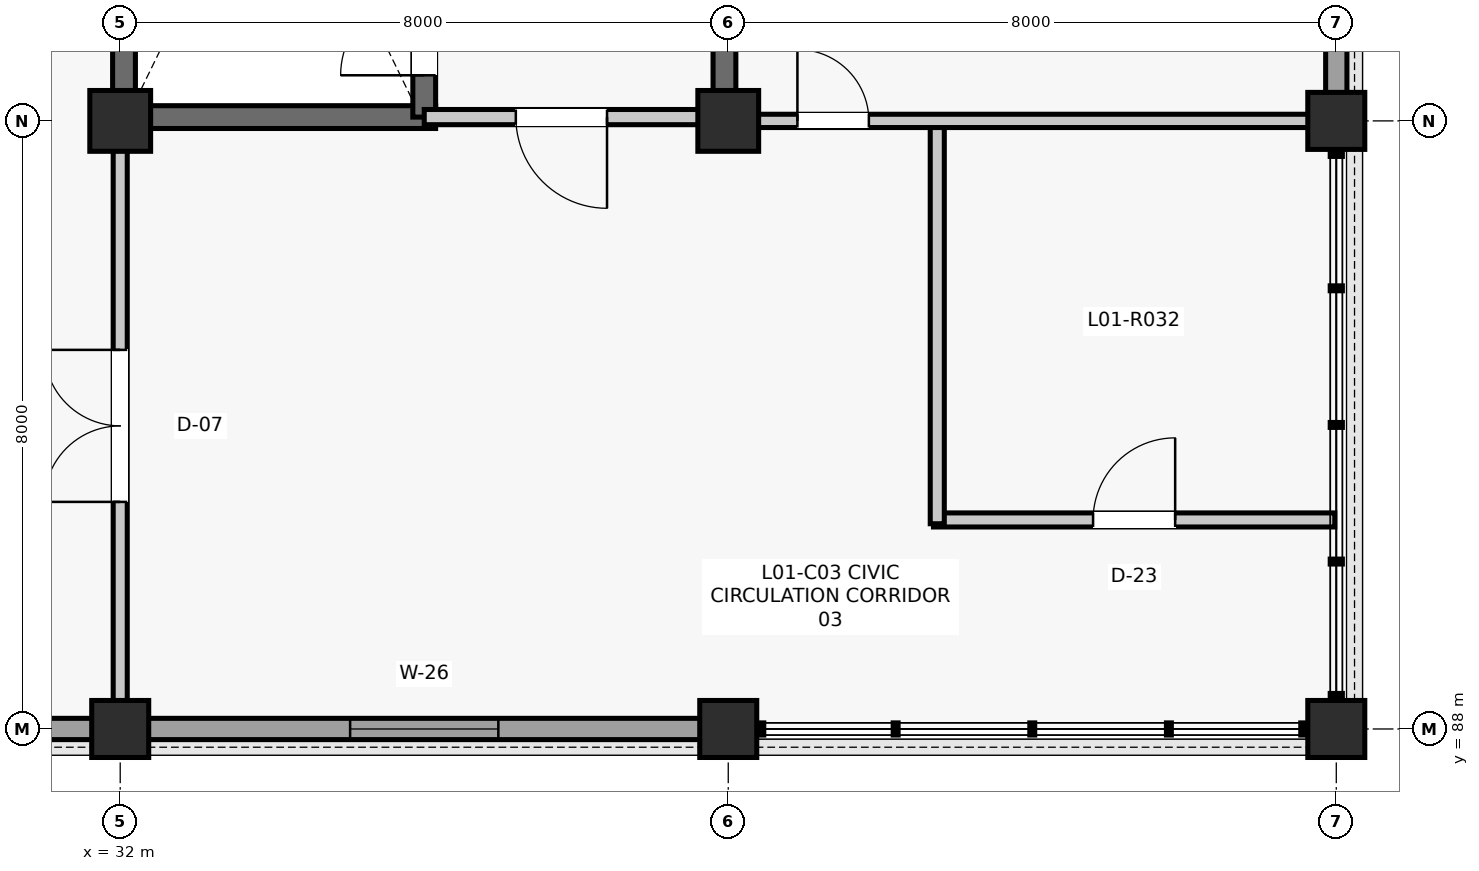
"""IFC4 building model, lengths in metres.
Left out: names, types, materials, properties, quantities, classifications, styles, units other than length and angle.
Written with IfcOpenShell. Run it as: python <this file> out.ifc"""

import sys

from ifc_helpers import new_model, si_unit, direction, frame, frame_2d, origin, origin_2d, place, context, subcontext, project, spatial, rectangle, extrude, element, fill, save


model = new_model("IFC4")
c1 = context("Model", 3, precision=1e-05, world=origin(), true_north=direction((0.0, 1.0)))
c2 = subcontext(c1, "Body", "Model", "MODEL_VIEW")
j1 = project(units=[si_unit("LENGTHUNIT", "METRE"), si_unit("PLANEANGLEUNIT", "RADIAN")], contexts=[c1])
p1 = place(None, origin())
s1 = spatial("IfcSite", under=j1, at=p1, CompositionType="ELEMENT")
p2 = place(p1, origin())
s2 = spatial("IfcBuilding", under=s1, at=p2, CompositionType="ELEMENT")
p3 = place(p2, frame((0.0, 0.0, 5.28)))
s3 = spatial("IfcBuildingStorey", under=s2, at=p3, CompositionType="ELEMENT", Elevation=5.28)
p4 = place(p3, frame((32.0, 88.0, 0.0), z_axis=(0.0, 0.0, 1.0), x_axis=(1.0, 0.0, 0.0)))
e1 = element("IfcColumn", 1, at=p4, inside=s3, PredefinedType="COLUMN", context=c2, shape_type="SweptSolid", body=[
    extrude(rectangle(XDim=0.75, YDim=0.75, at=origin_2d()), origin(), (0.0, 0.0, 1.0), 4.62),
])
p5 = place(p3, frame((32.0, 96.0, 0.0), z_axis=(0.0, 0.0, 1.0), x_axis=(1.0, 0.0, 0.0)))
e2 = element("IfcColumn", 2, at=p5, inside=s3, PredefinedType="COLUMN", context=c2, shape_type="SweptSolid", body=[
    extrude(rectangle(XDim=0.8, YDim=0.8, at=origin_2d()), origin(), (0.0, 0.0, 1.0), 4.62),
])
p6 = place(p3, frame((40.0, 88.0, 0.0), z_axis=(0.0, 0.0, 1.0), x_axis=(1.0, 0.0, 0.0)))
e3 = element("IfcColumn", 3, at=p6, inside=s3, PredefinedType="COLUMN", context=c2, shape_type="SweptSolid", body=[
    extrude(rectangle(XDim=0.75, YDim=0.75, at=origin_2d()), origin(), (0.0, 0.0, 1.0), 4.62),
])
p7 = place(p3, frame((40.0, 96.0, 0.0), z_axis=(0.0, 0.0, 1.0), x_axis=(1.0, 0.0, 0.0)))
e4 = element("IfcColumn", 4, at=p7, inside=s3, PredefinedType="COLUMN", context=c2, shape_type="SweptSolid", body=[
    extrude(rectangle(XDim=0.8, YDim=0.8, at=origin_2d()), origin(), (0.0, 0.0, 1.0), 4.62),
])
for number, where, z_axis, x_axis in (
    (5, (48.0, 88.0, 0.0), (0.0, 0.0, 1.0), (1.0, 0.0, 0.0)),
    (6, (48.0, 96.0, 0.0), (0.0, 0.0, 1.0), (1.0, 0.0, 0.0)),
):
    element("IfcColumn", number, at=place(p3, frame(where, z_axis=z_axis, x_axis=x_axis)), inside=s3, PredefinedType="COLUMN", context=c2, shape_type="SweptSolid", body=[
        extrude(rectangle(XDim=0.75, YDim=0.75, at=origin_2d()), origin(), (0.0, 0.0, 1.0), 4.62),
    ])
p8 = place(p3, frame((24.36, 88.0, 0.0), z_axis=(0.0, 0.0, 1.0), x_axis=(1.0, 0.0, 0.0)))
e7 = element("IfcWall", 7, at=p8, inside=s3, PredefinedType="SOLIDWALL", context=c2, shape_type="SweptSolid", body=[
    extrude(rectangle(XDim=7.28, YDim=0.28, at=frame_2d((3.64, 0.0))), origin(), (0.0, 0.0, 1.0), 3.977),
])
p9 = place(p8, frame((2.74, 0.0, 0.9)))
e8 = element("IfcOpeningElement", 8, at=p9, cuts=e7, PredefinedType="OPENING", context=c2, shape_type="SweptSolid", body=[
    extrude(rectangle(XDim=1.8, YDim=2.3, at=frame_2d((0.9, 1.15))), frame((0.0, 0.15, 0.0), z_axis=(0.0, -1.0, 0.0), x_axis=(1.0, 0.0, 0.0)), (0.0, 0.0, 1.0), 0.3),
])
p10 = place(p3, frame((32.36, 88.0, 0.0), z_axis=(0.0, 0.0, 1.0), x_axis=(1.0, 0.0, 0.0)))
e9 = element("IfcWall", 9, at=p10, inside=s3, PredefinedType="SOLIDWALL", context=c2, shape_type="SweptSolid", body=[
    extrude(rectangle(XDim=7.28, YDim=0.28, at=frame_2d((3.64, 0.0))), origin(), (0.0, 0.0, 1.0), 3.91),
])
p11 = place(p10, frame((2.665, 0.0, 0.9)))
e10 = element("IfcOpeningElement", 10, at=p11, cuts=e9, PredefinedType="OPENING", context=c2, shape_type="SweptSolid", body=[
    extrude(rectangle(XDim=1.95, YDim=2.45, at=frame_2d((0.975, 1.225))), frame((0.0, 0.15, 0.0), z_axis=(0.0, -1.0, 0.0), x_axis=(1.0, 0.0, 0.0)), (0.0, 0.0, 1.0), 0.3),
])
p12 = place(p3, frame((48.0, 96.36, 0.0), z_axis=(0.0, 0.0, 1.0), x_axis=(0.0, 1.0, 0.0)))
e11 = element("IfcWall", 11, at=p12, inside=s3, PredefinedType="SOLIDWALL", context=c2, shape_type="SweptSolid", body=[
    extrude(rectangle(XDim=7.28, YDim=0.28, at=frame_2d((3.64, 0.0))), origin(), (0.0, 0.0, 1.0), 3.977),
])
p13 = place(p12, frame((2.59, 0.0, 0.9)))
e12 = element("IfcOpeningElement", 12, at=p13, cuts=e11, PredefinedType="OPENING", context=c2, shape_type="SweptSolid", body=[
    extrude(rectangle(XDim=2.1, YDim=2.4, at=frame_2d((1.05, 1.2))), frame((0.0, 0.15, 0.0), z_axis=(0.0, -1.0, 0.0), x_axis=(1.0, 0.0, 0.0)), (0.0, 0.0, 1.0), 0.3),
])
for number, where, z_axis, x_axis in (
    (13, (32.05, 96.29, 0.0), (0.0, 0.0, 1.0), (0.0, 1.0, 0.0)),
    (14, (39.95, 96.29, 0.0), (0.0, 0.0, 1.0), (0.0, 1.0, 0.0)),
):
    element("IfcWall", number, at=place(p3, frame(where, z_axis=z_axis, x_axis=x_axis)), inside=s3, PredefinedType="SHEAR", context=c2, shape_type="SweptSolid", body=[
        extrude(rectangle(XDim=7.42, YDim=0.3, at=frame_2d((3.71, 0.0))), origin(), (0.0, 0.0, 1.0), 4.335),
    ])
p14 = place(p3, frame((32.29, 96.05, 0.0), z_axis=(0.0, 0.0, 1.0), x_axis=(1.0, 0.0, 0.0)))
e15 = element("IfcWall", 15, at=p14, inside=s3, PredefinedType="SHEAR", context=c2, shape_type="SweptSolid", body=[
    extrude(rectangle(XDim=3.86, YDim=0.3, at=frame_2d((1.93, 0.0))), origin(), (0.0, 0.0, 1.0), 4.335),
])
p15 = place(p3, frame((36.0, 96.05, 0.0), z_axis=(0.0, 0.0, 1.0), x_axis=(0.0, 1.0, 0.0)))
e16 = element("IfcWall", 16, at=p15, inside=s3, PredefinedType="SHEAR", context=c2, shape_type="SweptSolid", body=[
    extrude(rectangle(XDim=7.9, YDim=0.3, at=frame_2d((3.95, 0.0))), origin(), (0.0, 0.0, 1.0), 4.335),
])
p16 = place(p15, frame((0.55, 0.0, 0.0)))
e17 = element("IfcOpeningElement", 17, at=p16, cuts=e16, PredefinedType="OPENING", context=c2, shape_type="SweptSolid", body=[
    extrude(rectangle(XDim=1.1, YDim=2.15, at=frame_2d((0.55, 1.075))), frame((0.0, 0.16, 0.0), z_axis=(0.0, -1.0, 0.0), x_axis=(1.0, 0.0, 0.0)), (0.0, 0.0, 1.0), 0.32),
])
p17 = place(p3, frame((36.0, 96.05, 0.0), z_axis=(0.0, 0.0, 1.0), x_axis=(1.0, 0.0, 0.0)))
e18 = element("IfcWall", 18, at=p17, inside=s3, PredefinedType="PARTITIONING", context=c2, shape_type="SweptSolid", body=[
    extrude(rectangle(XDim=3.61, YDim=0.2, at=frame_2d((1.805, 0.0))), origin(), (0.0, 0.0, 1.0), 3.712),
])
p18 = place(p17, frame((1.205, 0.0, 0.0)))
e19 = element("IfcOpeningElement", 19, at=p18, cuts=e18, PredefinedType="OPENING", context=c2, shape_type="SweptSolid", body=[
    extrude(rectangle(XDim=1.2, YDim=2.15, at=frame_2d((0.6, 1.075))), frame((0.0, 0.11, 0.0), z_axis=(0.0, -1.0, 0.0), x_axis=(1.0, 0.0, 0.0)), (0.0, 0.0, 1.0), 0.22),
])
p19 = place(p3, frame((42.7, 90.75, 0.0), z_axis=(0.0, 0.0, 1.0), x_axis=(1.0, 0.0, 0.0)))
e20 = element("IfcWall", 20, at=p19, inside=s3, PredefinedType="PARTITIONING", context=c2, shape_type="SweptSolid", body=[
    extrude(rectangle(XDim=5.28, YDim=0.185, at=frame_2d((2.64, 0.0))), origin(), (0.0, 0.0, 1.0), 3.907),
])
p20 = place(p19, frame((2.1, 0.0, 0.0)))
e21 = element("IfcOpeningElement", 21, at=p20, cuts=e20, PredefinedType="OPENING", context=c2, shape_type="SweptSolid", body=[
    extrude(rectangle(XDim=1.08, YDim=2.2, at=frame_2d((0.54, 1.1))), frame((0.0, 0.103, 0.0), z_axis=(0.0, -1.0, 0.0), x_axis=(1.0, 0.0, 0.0)), (0.0, 0.0, 1.0), 0.205),
])
p21 = place(p3, frame((42.75, 90.7, 0.0), z_axis=(0.0, 0.0, 1.0), x_axis=(0.0, 1.0, 0.0)))
e22 = element("IfcWall", 22, at=p21, inside=s3, PredefinedType="PARTITIONING", context=c2, shape_type="SweptSolid", body=[
    extrude(rectangle(XDim=5.28, YDim=0.185, at=frame_2d((2.64, 0.0))), origin(), (0.0, 0.0, 1.0), 3.787),
])
p22 = place(p3, frame((32.0, 88.365, 0.0), z_axis=(0.0, 0.0, 1.0), x_axis=(0.0, 1.0, 0.0)))
e23 = element("IfcWall", 23, at=p22, inside=s3, PredefinedType="PARTITIONING", context=c2, shape_type="SweptSolid", body=[
    extrude(rectangle(XDim=7.245, YDim=0.185, at=frame_2d((3.623, 0.0))), origin(), (0.0, 0.0, 1.0), 3.851),
])
p23 = place(p22, frame((2.623, 0.0, 0.0)))
e24 = element("IfcOpeningElement", 24, at=p23, cuts=e23, PredefinedType="OPENING", context=c2, shape_type="SweptSolid", body=[
    extrude(rectangle(XDim=2.0, YDim=2.4, at=frame_2d((1.0, 1.2))), frame((0.0, 0.103, 0.0), z_axis=(0.0, -1.0, 0.0), x_axis=(1.0, 0.0, 0.0)), (0.0, 0.0, 1.0), 0.205),
])
p24 = place(p3, frame((40.39, 96.0, 0.0), z_axis=(0.0, 0.0, 1.0), x_axis=(1.0, 0.0, 0.0)))
e25 = element("IfcWall", 25, at=p24, inside=s3, PredefinedType="PARTITIONING", context=c2, shape_type="SweptSolid", body=[
    extrude(rectangle(XDim=7.245, YDim=0.175, at=frame_2d((3.623, 0.0))), origin(), (0.0, 0.0, 1.0), 3.787),
])
p25 = place(p24, frame((0.52, 0.0, 0.0)))
e26 = element("IfcOpeningElement", 26, at=p25, cuts=e25, PredefinedType="OPENING", context=c2, shape_type="SweptSolid", body=[
    extrude(rectangle(XDim=0.94, YDim=2.12, at=frame_2d((0.47, 1.06))), frame((0.0, 0.097, 0.0), z_axis=(0.0, -1.0, 0.0), x_axis=(1.0, 0.0, 0.0)), (0.0, 0.0, 1.0), 0.195),
])
p26 = place(p11, origin())
e27 = element("IfcWindow", 27, at=p26, inside=s3, PartitioningType="SINGLE_PANEL", PredefinedType="WINDOW", context=c2, shape_type="SweptSolid", body=[
    extrude(rectangle(XDim=1.95, YDim=2.45, at=frame_2d((0.975, 1.225))), frame((0.0, 0.03, 0.0), z_axis=(0.0, -1.0, 0.0), x_axis=(1.0, 0.0, 0.0)), (0.0, 0.0, 1.0), 0.06),
])
fill(e10, e27)
p27 = place(p16, origin())
e28 = element("IfcDoor", 28, at=p27, inside=s3, OperationType="SINGLE_SWING_LEFT", PredefinedType="DOOR", context=c2, shape_type="SweptSolid", body=[
    extrude(rectangle(XDim=1.1, YDim=2.15, at=frame_2d((0.55, 1.075))), frame((0.0, 0.025, 0.0), z_axis=(0.0, -1.0, 0.0), x_axis=(1.0, 0.0, 0.0)), (0.0, 0.0, 1.0), 0.05),
])
fill(e17, e28)
p28 = place(p18, frame((1.2, 0.0, 0.0), z_axis=(0.0, 0.0, 1.0), x_axis=(-1.0, 0.0, 0.0)))
e29 = element("IfcDoor", 29, at=p28, inside=s3, OperationType="SINGLE_SWING_RIGHT", PredefinedType="DOOR", context=c2, shape_type="SweptSolid", body=[
    extrude(rectangle(XDim=1.2, YDim=2.15, at=frame_2d((0.6, 1.075))), frame((0.0, 0.025, 0.0), z_axis=(0.0, -1.0, 0.0), x_axis=(1.0, 0.0, 0.0)), (0.0, 0.0, 1.0), 0.05),
])
fill(e19, e29)
p29 = place(p20, origin())
e30 = element("IfcDoor", 30, at=p29, inside=s3, OperationType="SINGLE_SWING_RIGHT", PredefinedType="DOOR", context=c2, shape_type="SweptSolid", body=[
    extrude(rectangle(XDim=1.08, YDim=2.2, at=frame_2d((0.54, 1.1))), frame((0.0, 0.025, 0.0), z_axis=(0.0, -1.0, 0.0), x_axis=(1.0, 0.0, 0.0)), (0.0, 0.0, 1.0), 0.05),
])
fill(e21, e30)
p30 = place(p23, origin())
e31 = element("IfcDoor", 31, at=p30, inside=s3, OperationType="DOUBLE_DOOR_SINGLE_SWING", PredefinedType="DOOR", context=c2, shape_type="SweptSolid", body=[
    extrude(rectangle(XDim=2.0, YDim=2.4, at=frame_2d((1.0, 1.2))), frame((0.0, 0.025, 0.0), z_axis=(0.0, -1.0, 0.0), x_axis=(1.0, 0.0, 0.0)), (0.0, 0.0, 1.0), 0.05),
])
fill(e24, e31)
p31 = place(p25, origin())
e32 = element("IfcDoor", 32, at=p31, inside=s3, OperationType="SINGLE_SWING_LEFT", PredefinedType="DOOR", context=c2, shape_type="SweptSolid", body=[
    extrude(rectangle(XDim=0.94, YDim=2.12, at=frame_2d((0.47, 1.06))), frame((0.0, 0.025, 0.0), z_axis=(0.0, -1.0, 0.0), x_axis=(1.0, 0.0, 0.0)), (0.0, 0.0, 1.0), 0.05),
])
fill(e26, e32)
save(model, sys.argv[1])
